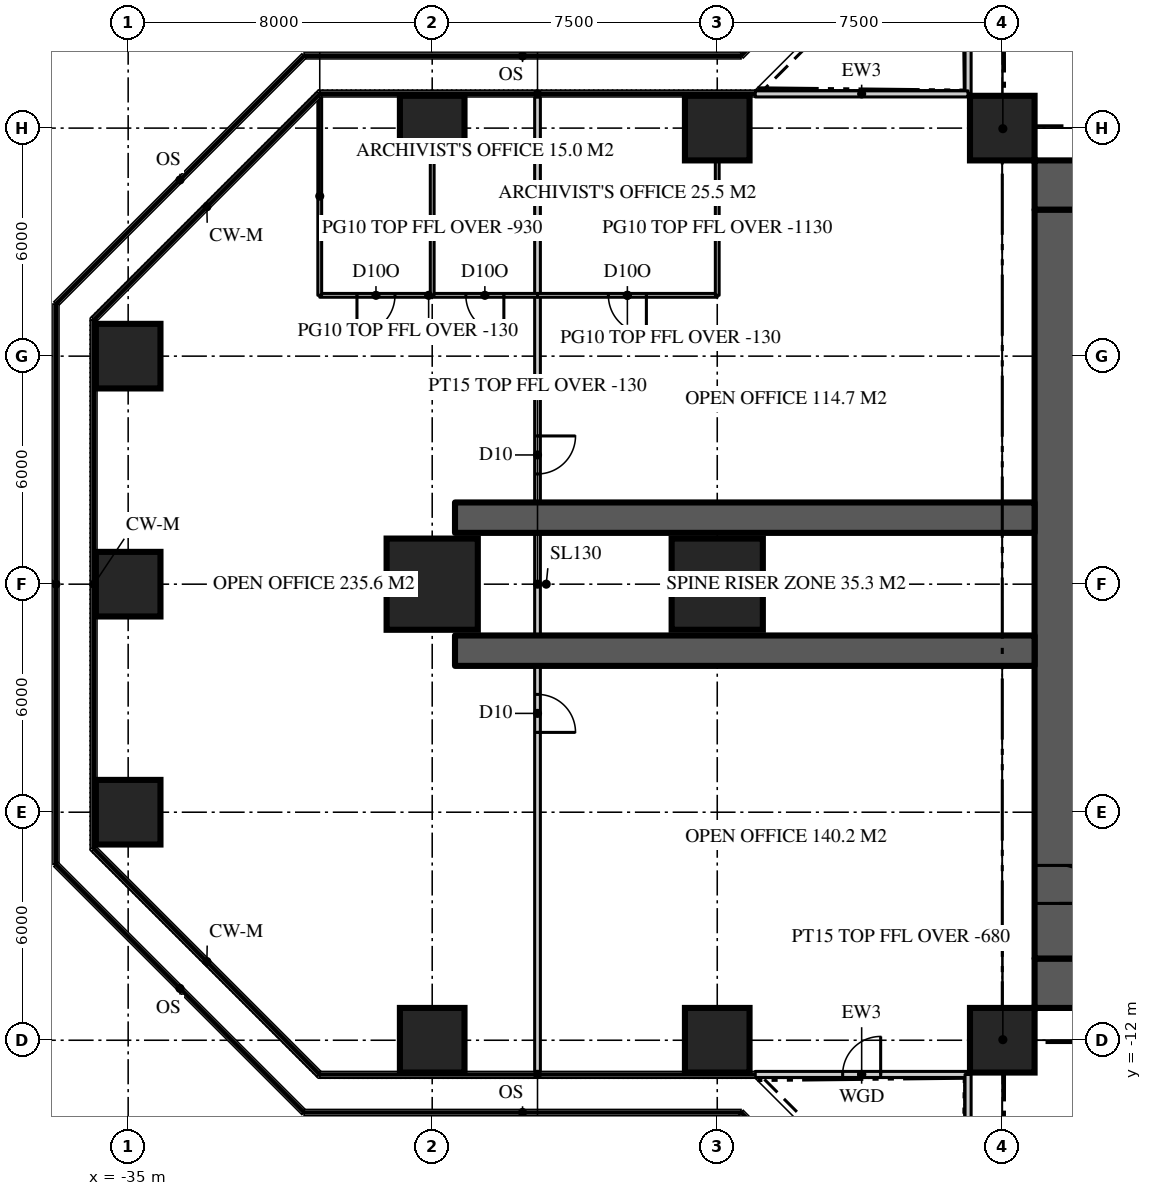
"""IFC4 building model, lengths in metres.
Left out: names, types, materials, properties, quantities, classifications, styles, units other than length and angle.
Written with IfcOpenShell. Run it as: python <this file> out.ifc"""

import sys

from ifc_helpers import new_model, si_unit, direction, frame, frame_2d, origin, origin_2d, place, context, subcontext, project, spatial, rectangle, extrude, element, fill, save


model = new_model("IFC4")
c1 = context("Model", 3, precision=1e-05, world=origin(), true_north=direction((0.0, 1.0)))
c2 = subcontext(c1, "Body", "Model", "MODEL_VIEW")
j1 = project(units=[si_unit("LENGTHUNIT", "METRE"), si_unit("PLANEANGLEUNIT", "RADIAN")], contexts=[c1])
p1 = place(None, origin())
s1 = spatial("IfcSite", under=j1, at=p1, CompositionType="ELEMENT")
p2 = place(p1, origin())
s2 = spatial("IfcBuilding", under=s1, at=p2, CompositionType="ELEMENT")
p3 = place(p2, frame((0.0, 0.0, 163.2)))
s3 = spatial("IfcBuildingStorey", under=s2, at=p3, CompositionType="ELEMENT", Elevation=163.2)
p4 = place(p3, frame((-11.15, 10.5, 0.0), z_axis=(0.0, 0.0, 1.0), x_axis=(1.0, 0.0, 0.0)))
e1 = element("IfcWall", 1, at=p4, inside=s3, PredefinedType="SHEAR", context=c2, shape_type="SweptSolid", body=[
    extrude(rectangle(XDim=22.3, YDim=1.3, at=frame_2d((11.15, 0.0))), origin(), (0.0, 0.0, 1.0), 3.9),
])
p5 = place(p4, frame((4.25, 0.0, 0.0)))
e2 = element("IfcOpeningElement", 2, at=p5, cuts=e1, PredefinedType="OPENING", context=c2, shape_type="SweptSolid", body=[
    extrude(rectangle(XDim=1.8, YDim=2.2, at=frame_2d((0.9, 1.1))), frame((0.0, 0.66, 0.0), z_axis=(0.0, -1.0, 0.0), x_axis=(1.0, 0.0, 0.0)), (0.0, 0.0, 1.0), 1.32),
])
p6 = place(p4, frame((16.25, 0.0, 0.0)))
e3 = element("IfcOpeningElement", 3, at=p6, cuts=e1, PredefinedType="OPENING", context=c2, shape_type="SweptSolid", body=[
    extrude(rectangle(XDim=1.8, YDim=2.2, at=frame_2d((0.9, 1.1))), frame((0.0, 0.66, 0.0), z_axis=(0.0, -1.0, 0.0), x_axis=(1.0, 0.0, 0.0)), (0.0, 0.0, 1.0), 1.32),
])
p7 = place(p3, frame((11.15, -10.5, 0.0), z_axis=(0.0, 0.0, 1.0), x_axis=(-1.0, 0.0, 0.0)))
e4 = element("IfcWall", 4, at=p7, inside=s3, PredefinedType="SHEAR", context=c2, shape_type="SweptSolid", body=[
    extrude(rectangle(XDim=22.3, YDim=1.3, at=frame_2d((11.15, 0.0))), origin(), (0.0, 0.0, 1.0), 3.9),
])
p8 = place(p7, frame((16.25, 0.0, 0.0)))
e5 = element("IfcOpeningElement", 5, at=p8, cuts=e4, PredefinedType="OPENING", context=c2, shape_type="SweptSolid", body=[
    extrude(rectangle(XDim=1.8, YDim=2.2, at=frame_2d((0.9, 1.1))), frame((0.0, 0.66, 0.0), z_axis=(0.0, -1.0, 0.0), x_axis=(1.0, 0.0, 0.0)), (0.0, 0.0, 1.0), 1.32),
])
p9 = place(p7, frame((4.25, 0.0, 0.0)))
e6 = element("IfcOpeningElement", 6, at=p9, cuts=e4, PredefinedType="OPENING", context=c2, shape_type="SweptSolid", body=[
    extrude(rectangle(XDim=1.8, YDim=2.2, at=frame_2d((0.9, 1.1))), frame((0.0, 0.66, 0.0), z_axis=(0.0, -1.0, 0.0), x_axis=(1.0, 0.0, 0.0)), (0.0, 0.0, 1.0), 1.32),
])
p10 = place(p3, frame((-10.5, 9.85, 0.0), z_axis=(0.0, 0.0, 1.0), x_axis=(0.0, -1.0, 0.0)))
e7 = element("IfcWall", 7, at=p10, inside=s3, PredefinedType="SHEAR", context=c2, shape_type="SweptSolid", body=[
    extrude(rectangle(XDim=19.7, YDim=1.3, at=frame_2d((9.85, 0.0))), origin(), (0.0, 0.0, 1.0), 3.9),
])
p11 = place(p10, frame((17.25, 0.0, 0.0)))
e8 = element("IfcOpeningElement", 8, at=p11, cuts=e7, PredefinedType="OPENING", context=c2, shape_type="SweptSolid", body=[
    extrude(rectangle(XDim=1.0, YDim=2.2, at=frame_2d((0.5, 1.1))), frame((0.0, 0.66, 0.0), z_axis=(0.0, -1.0, 0.0), x_axis=(1.0, 0.0, 0.0)), (0.0, 0.0, 1.0), 1.32),
])
for number, where, z_axis, x_axis in (
    (9, (-11.15, 1.75, 0.0), (0.0, 0.0, 1.0), (-1.0, 0.0, 0.0)),
    (10, (-11.15, -1.75, 0.0), (0.0, 0.0, 1.0), (-1.0, 0.0, 0.0)),
):
    element("IfcWall", number, at=place(p3, frame(where, z_axis=z_axis, x_axis=x_axis)), inside=s3, PredefinedType="SHEAR", context=c2, shape_type="SweptSolid", body=[
        extrude(rectangle(XDim=15.25, YDim=0.8, at=frame_2d((7.625, 0.0))), origin(), (0.0, 0.0, 1.0), 3.9),
    ])
for number, where, z_axis, x_axis in (
    (11, (-27.0, -12.0, 0.0), (0.0, 0.0, 1.0), (1.0, 0.0, 0.0)),
    (12, (-19.5, -12.0, 0.0), (0.0, 0.0, 1.0), (1.0, 0.0, 0.0)),
    (13, (-12.0, -12.0, 0.0), (0.0, 0.0, 1.0), (1.0, 0.0, 0.0)),
    (14, (-35.0, -6.0, 0.0), (0.0, 0.0, 1.0), (1.0, 0.0, 0.0)),
    (15, (-35.0, 0.0, 0.0), (0.0, 0.0, 1.0), (1.0, 0.0, 0.0)),
):
    element("IfcColumn", number, at=place(p3, frame(where, z_axis=z_axis, x_axis=x_axis)), inside=s3, PredefinedType="COLUMN", context=c2, shape_type="SweptSolid", body=[
        extrude(rectangle(XDim=1.7, YDim=1.7, at=origin_2d()), origin(), (0.0, 0.0, 1.0), 3.9),
    ])
for number, where, z_axis, x_axis in (
    (16, (-27.0, 0.0, 0.0), (0.0, 0.0, 1.0), (1.0, 0.0, 0.0)),
    (17, (-19.5, 0.0, 0.0), (0.0, 0.0, 1.0), (1.0, 0.0, 0.0)),
):
    element("IfcColumn", number, at=place(p3, frame(where, z_axis=z_axis, x_axis=x_axis)), inside=s3, PredefinedType="COLUMN", context=c2, shape_type="SweptSolid", body=[
        extrude(rectangle(XDim=2.4, YDim=2.4, at=origin_2d()), origin(), (0.0, 0.0, 1.0), 3.9),
    ])
for number, where, z_axis, x_axis in (
    (18, (-35.0, 6.0, 0.0), (0.0, 0.0, 1.0), (1.0, 0.0, 0.0)),
    (19, (-27.0, 12.0, 0.0), (0.0, 0.0, 1.0), (1.0, 0.0, 0.0)),
    (20, (-19.5, 12.0, 0.0), (0.0, 0.0, 1.0), (1.0, 0.0, 0.0)),
    (21, (-12.0, 12.0, 0.0), (0.0, 0.0, 1.0), (1.0, 0.0, 0.0)),
):
    element("IfcColumn", number, at=place(p3, frame(where, z_axis=z_axis, x_axis=x_axis)), inside=s3, PredefinedType="COLUMN", context=c2, shape_type="SweptSolid", body=[
        extrude(rectangle(XDim=1.7, YDim=1.7, at=origin_2d()), origin(), (0.0, 0.0, 1.0), 3.9),
    ])
p12 = place(p3, frame((-12.9, 18.5, 0.0), z_axis=(0.0, 0.0, 1.0), x_axis=(0.0, -1.0, 0.0)))
e22 = element("IfcWall", 22, at=p12, inside=s3, PredefinedType="SOLIDWALL", context=c2, shape_type="SweptSolid", body=[
    extrude(rectangle(XDim=5.6, YDim=0.16, at=frame_2d((2.8, 0.0))), origin(), (0.0, 0.0, 1.0), 3.77),
])
p13 = place(p12, frame((2.3, 0.0, 0.0)))
e23 = element("IfcOpeningElement", 23, at=p13, cuts=e22, PredefinedType="OPENING", context=c2, shape_type="SweptSolid", body=[
    extrude(rectangle(XDim=1.0, YDim=2.2, at=frame_2d((0.5, 1.1))), frame((0.0, 0.09, 0.0), z_axis=(0.0, -1.0, 0.0), x_axis=(1.0, 0.0, 0.0)), (0.0, 0.0, 1.0), 0.18),
])
p14 = place(p3, frame((-12.9, 12.9, 0.0), z_axis=(0.0, 0.0, 1.0), x_axis=(-1.0, 0.0, 0.0)))
e24 = element("IfcWall", 24, at=p14, inside=s3, PredefinedType="SOLIDWALL", context=c2, shape_type="SweptSolid", body=[
    extrude(rectangle(XDim=5.6, YDim=0.16, at=frame_2d((2.8, 0.0))), origin(), (0.0, 0.0, 1.0), 3.77),
])
p15 = place(p3, frame((-18.5, -12.9, 0.0), z_axis=(0.0, 0.0, 1.0), x_axis=(1.0, 0.0, 0.0)))
e25 = element("IfcWall", 25, at=p15, inside=s3, PredefinedType="SOLIDWALL", context=c2, shape_type="SweptSolid", body=[
    extrude(rectangle(XDim=5.6, YDim=0.16, at=frame_2d((2.8, 0.0))), origin(), (0.0, 0.0, 1.0), 3.77),
])
p16 = place(p15, frame((2.3, 0.0, 0.0)))
e26 = element("IfcOpeningElement", 26, at=p16, cuts=e25, PredefinedType="OPENING", context=c2, shape_type="SweptSolid", body=[
    extrude(rectangle(XDim=1.0, YDim=2.2, at=frame_2d((0.5, 1.1))), frame((0.0, 0.09, 0.0), z_axis=(0.0, -1.0, 0.0), x_axis=(1.0, 0.0, 0.0)), (0.0, 0.0, 1.0), 0.18),
])
p17 = place(p3, frame((-12.9, -12.9, 0.0), z_axis=(0.0, 0.0, 1.0), x_axis=(0.0, -1.0, 0.0)))
e27 = element("IfcWall", 27, at=p17, inside=s3, PredefinedType="SOLIDWALL", context=c2, shape_type="SweptSolid", body=[
    extrude(rectangle(XDim=5.6, YDim=0.16, at=frame_2d((2.8, 0.0))), origin(), (0.0, 0.0, 1.0), 3.77),
])
p18 = place(p3, frame((-24.229, 12.82, 0.0), z_axis=(0.0, 0.0, 1.0), x_axis=(0.0, -1.0, 0.0)))
e28 = element("IfcWall", 28, at=p18, inside=s3, PredefinedType="PARTITIONING", context=c2, shape_type="SweptSolid", body=[
    extrude(rectangle(XDim=25.64, YDim=0.15, at=frame_2d((12.82, 0.0))), origin(), (0.0, 0.0, 1.0), 3.77),
])
p19 = place(p18, frame((15.72, 0.0, 0.0)))
e29 = element("IfcOpeningElement", 29, at=p19, cuts=e28, PredefinedType="OPENING", context=c2, shape_type="SweptSolid", body=[
    extrude(rectangle(XDim=1.0, YDim=2.2, at=frame_2d((0.5, 1.1))), frame((0.0, 0.085, 0.0), z_axis=(0.0, -1.0, 0.0), x_axis=(1.0, 0.0, 0.0)), (0.0, 0.0, 1.0), 0.17),
])
p20 = place(p18, frame((8.92, 0.0, 0.0)))
e30 = element("IfcOpeningElement", 30, at=p20, cuts=e28, PredefinedType="OPENING", context=c2, shape_type="SweptSolid", body=[
    extrude(rectangle(XDim=1.0, YDim=2.2, at=frame_2d((0.5, 1.1))), frame((0.0, 0.085, 0.0), z_axis=(0.0, -1.0, 0.0), x_axis=(1.0, 0.0, 0.0)), (0.0, 0.0, 1.0), 0.17),
])
p21 = place(p3, frame((-19.5, 7.6, 0.0), z_axis=(0.0, 0.0, 1.0), x_axis=(-1.0, 0.0, 0.0)))
e31 = element("IfcWall", 31, at=p21, inside=s3, PredefinedType="PARTITIONING", context=c2, shape_type="SweptSolid", body=[
    extrude(rectangle(XDim=4.729, YDim=0.1, at=frame_2d((2.365, 0.0))), origin(), (0.0, 0.0, 1.0), 3.77),
])
p22 = place(p21, frame((1.865, 0.0, 0.0)))
e32 = element("IfcOpeningElement", 32, at=p22, cuts=e31, PredefinedType="OPENING", context=c2, shape_type="SweptSolid", body=[
    extrude(rectangle(XDim=1.0, YDim=2.2, at=frame_2d((0.5, 1.1))), frame((0.0, 0.06, 0.0), z_axis=(0.0, -1.0, 0.0), x_axis=(1.0, 0.0, 0.0)), (0.0, 0.0, 1.0), 0.12),
])
p23 = place(p3, frame((-24.229, 7.6, 0.0), z_axis=(0.0, 0.0, 1.0), x_axis=(-1.0, 0.0, 0.0)))
e33 = element("IfcWall", 33, at=p23, inside=s3, PredefinedType="PARTITIONING", context=c2, shape_type="SweptSolid", body=[
    extrude(rectangle(XDim=5.73, YDim=0.1, at=frame_2d((2.865, 0.0))), origin(), (0.0, 0.0, 1.0), 3.77),
])
p24 = place(p23, frame((0.885, 0.0, 0.0)))
e34 = element("IfcOpeningElement", 34, at=p24, cuts=e33, PredefinedType="OPENING", context=c2, shape_type="SweptSolid", body=[
    extrude(rectangle(XDim=1.0, YDim=2.2, at=frame_2d((0.5, 1.1))), frame((0.0, 0.06, 0.0), z_axis=(0.0, -1.0, 0.0), x_axis=(1.0, 0.0, 0.0)), (0.0, 0.0, 1.0), 0.12),
])
p25 = place(p23, frame((3.75, 0.0, 0.0)))
e35 = element("IfcOpeningElement", 35, at=p25, cuts=e33, PredefinedType="OPENING", context=c2, shape_type="SweptSolid", body=[
    extrude(rectangle(XDim=1.0, YDim=2.2, at=frame_2d((0.5, 1.1))), frame((0.0, 0.06, 0.0), z_axis=(0.0, -1.0, 0.0), x_axis=(1.0, 0.0, 0.0)), (0.0, 0.0, 1.0), 0.12),
])
p26 = place(p3, frame((-19.5, 7.6, 0.0), z_axis=(0.0, 0.0, 1.0), x_axis=(0.0, 1.0, 0.0)))
e36 = element("IfcWall", 36, at=p26, inside=s3, PredefinedType="PARTITIONING", context=c2, shape_type="SweptSolid", body=[
    extrude(rectangle(XDim=3.55, YDim=0.1, at=frame_2d((1.775, 0.0))), origin(), (0.0, 0.0, 1.0), 2.77),
])
p27 = place(p3, frame((-27.0, 7.6, 0.0), z_axis=(0.0, 0.0, 1.0), x_axis=(0.0, 1.0, 0.0)))
e37 = element("IfcWall", 37, at=p27, inside=s3, PredefinedType="PARTITIONING", context=c2, shape_type="SweptSolid", body=[
    extrude(rectangle(XDim=3.55, YDim=0.1, at=frame_2d((1.775, 0.0))), origin(), (0.0, 0.0, 1.0), 2.97),
])
p28 = place(p3, frame((-29.959, 7.6, 0.0), z_axis=(0.0, 0.0, 1.0), x_axis=(0.0, 1.0, 0.0)))
e38 = element("IfcWall", 38, at=p28, inside=s3, PredefinedType="PARTITIONING", context=c2, shape_type="SweptSolid", body=[
    extrude(rectangle(XDim=5.22, YDim=0.1, at=frame_2d((2.61, 0.0))), origin(), (0.0, 0.0, 1.0), 3.77),
])
for number, where, z_axis, x_axis in (
    (39, (-11.15, 11.15, 0.0), (0.0, 0.0, 1.0), (-0.707, 0.707, 0.0)),
    (40, (-11.15, -11.15, 0.0), (0.0, 0.0, 1.0), (-0.707, -0.707, 0.0)),
):
    element("IfcWall", number, at=place(p3, frame(where, z_axis=z_axis, x_axis=x_axis)), inside=s3, PredefinedType="PARTITIONING", context=c2, shape_type="SweptSolid", body=[
        extrude(rectangle(XDim=2.362, YDim=0.15, at=frame_2d((1.181, 0.0))), origin(), (0.0, 0.0, 1.0), 3.22),
    ])
p29 = place(p16, origin())
e41 = element("IfcDoor", 41, at=p29, inside=s3, OperationType="SINGLE_SWING_RIGHT", PredefinedType="DOOR", context=c2, shape_type="SweptSolid", body=[
    extrude(rectangle(XDim=1.0, YDim=2.2, at=frame_2d((0.5, 1.1))), frame((0.0, 0.025, 0.0), z_axis=(0.0, -1.0, 0.0), x_axis=(1.0, 0.0, 0.0)), (0.0, 0.0, 1.0), 0.05),
])
fill(e26, e41)
p30 = place(p11, origin())
e42 = element("IfcDoor", 42, at=p30, inside=s3, OperationType="SINGLE_SWING_RIGHT", PredefinedType="DOOR", context=c2, shape_type="SweptSolid", body=[
    extrude(rectangle(XDim=1.0, YDim=2.2, at=frame_2d((0.5, 1.1))), frame((0.0, 0.025, 0.0), z_axis=(0.0, -1.0, 0.0), x_axis=(1.0, 0.0, 0.0)), (0.0, 0.0, 1.0), 0.05),
])
fill(e8, e42)
p31 = place(p19, origin())
e43 = element("IfcDoor", 43, at=p31, inside=s3, OperationType="SINGLE_SWING_RIGHT", PredefinedType="DOOR", context=c2, shape_type="SweptSolid", body=[
    extrude(rectangle(XDim=1.0, YDim=2.2, at=frame_2d((0.5, 1.1))), frame((0.0, 0.025, 0.0), z_axis=(0.0, -1.0, 0.0), x_axis=(1.0, 0.0, 0.0)), (0.0, 0.0, 1.0), 0.05),
])
fill(e29, e43)
p32 = place(p20, origin())
e44 = element("IfcDoor", 44, at=p32, inside=s3, OperationType="SINGLE_SWING_LEFT", PredefinedType="DOOR", context=c2, shape_type="SweptSolid", body=[
    extrude(rectangle(XDim=1.0, YDim=2.2, at=frame_2d((0.5, 1.1))), frame((0.0, 0.025, 0.0), z_axis=(0.0, -1.0, 0.0), x_axis=(1.0, 0.0, 0.0)), (0.0, 0.0, 1.0), 0.05),
])
fill(e30, e44)
p33 = place(p22, origin())
e45 = element("IfcDoor", 45, at=p33, inside=s3, OperationType="SINGLE_SWING_LEFT", PredefinedType="DOOR", context=c2, shape_type="SweptSolid", body=[
    extrude(rectangle(XDim=1.0, YDim=2.2, at=frame_2d((0.5, 1.1))), frame((0.0, 0.025, 0.0), z_axis=(0.0, -1.0, 0.0), x_axis=(1.0, 0.0, 0.0)), (0.0, 0.0, 1.0), 0.05),
])
fill(e32, e45)
p34 = place(p24, origin())
e46 = element("IfcDoor", 46, at=p34, inside=s3, OperationType="SINGLE_SWING_LEFT", PredefinedType="DOOR", context=c2, shape_type="SweptSolid", body=[
    extrude(rectangle(XDim=1.0, YDim=2.2, at=frame_2d((0.5, 1.1))), frame((0.0, 0.025, 0.0), z_axis=(0.0, -1.0, 0.0), x_axis=(1.0, 0.0, 0.0)), (0.0, 0.0, 1.0), 0.05),
])
fill(e34, e46)
p35 = place(p25, origin())
e47 = element("IfcDoor", 47, at=p35, inside=s3, OperationType="SINGLE_SWING_RIGHT", PredefinedType="DOOR", context=c2, shape_type="SweptSolid", body=[
    extrude(rectangle(XDim=1.0, YDim=2.2, at=frame_2d((0.5, 1.1))), frame((0.0, 0.025, 0.0), z_axis=(0.0, -1.0, 0.0), x_axis=(1.0, 0.0, 0.0)), (0.0, 0.0, 1.0), 0.05),
])
fill(e35, e47)
save(model, sys.argv[1])
